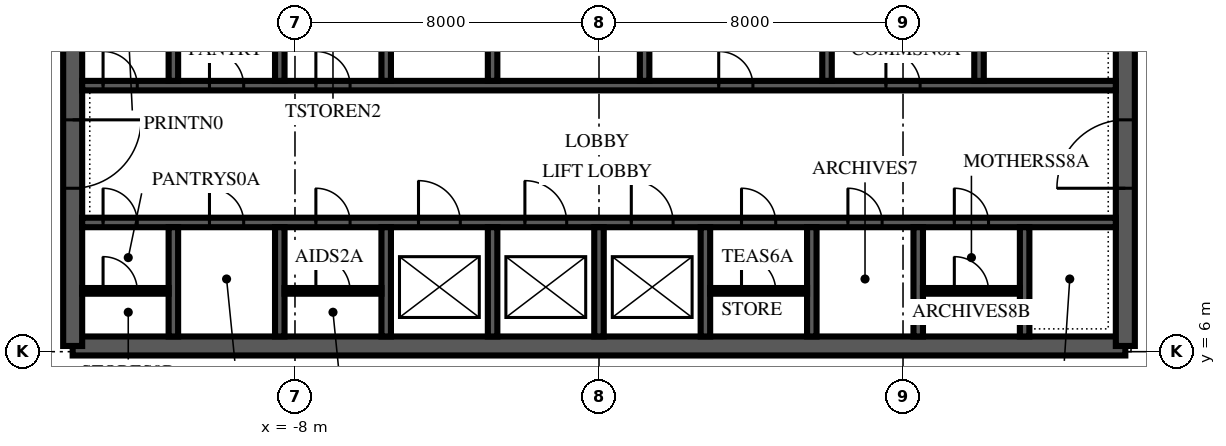
"""IFC4 building model, lengths in metres.
Left out: names, types, materials, properties, quantities, classifications, styles, units other than length and angle.
Written with IfcOpenShell. Run it as: python <this file> out.ifc"""

import sys

from ifc_helpers import new_model, si_unit, direction, frame, frame_2d, origin, place, context, subcontext, project, spatial, polyline, rectangle, outline, extrude, element, fill, save


model = new_model("IFC4")
c1 = context("Model", 3, precision=1e-05, world=origin(), true_north=direction((0.0, 1.0)))
c2 = subcontext(c1, "Body", "Model", "MODEL_VIEW")
j1 = project(units=[si_unit("LENGTHUNIT", "METRE"), si_unit("PLANEANGLEUNIT", "RADIAN")], contexts=[c1])
p1 = place(None, origin())
s1 = spatial("IfcSite", under=j1, at=p1, CompositionType="ELEMENT")
p2 = place(p1, origin())
s2 = spatial("IfcBuilding", under=s1, at=p2, CompositionType="ELEMENT")
p3 = place(p2, frame((0.0, 0.0, 248.0)))
s3 = spatial("IfcBuildingStorey", under=s2, at=p3, CompositionType="ELEMENT", Elevation=248.0)
p4 = place(p3, frame((-13.85, 6.15, 0.0), z_axis=(0.0, 0.0, 1.0), x_axis=(1.0, 0.0, 0.0)))
e1 = element("IfcWall", 1, at=p4, inside=s3, PredefinedType="SHEAR", context=c2, shape_type="SweptSolid", body=[
    extrude(rectangle(XDim=27.7, YDim=0.5, at=frame_2d((13.85, 0.0))), origin(), (0.0, 0.0, 1.0), 4.0),
])
p5 = place(p3, frame((13.85, 6.15, 0.0), z_axis=(0.0, 0.0, 1.0), x_axis=(0.0, 1.0, 0.0)))
e2 = element("IfcWall", 2, at=p5, inside=s3, PredefinedType="SHEAR", context=c2, shape_type="SweptSolid", body=[
    extrude(outline(polyline([(0.0, -0.25), (17.7, -0.25), (17.7, 0.0), (17.45, 0.0), (17.45, 0.25), (0.25, 0.25), (0.25, 0.0), (0.0, 0.0), (0.0, -0.25)])), origin(), (0.0, 0.0, 1.0), 4.0),
])
p6 = place(p5, frame((4.15, 0.0, 0.0)))
e3 = element("IfcOpeningElement", 3, at=p6, cuts=e2, PredefinedType="OPENING", context=c2, shape_type="SweptSolid", body=[
    extrude(rectangle(XDim=1.8, YDim=2.4, at=frame_2d((0.9, 1.2))), frame((0.0, 0.265, 0.0), z_axis=(0.0, -1.0, 0.0), x_axis=(1.0, 0.0, 0.0)), (0.0, 0.0, 1.0), 0.53),
])
p7 = place(p3, frame((-13.85, 23.85, 0.0), z_axis=(0.0, 0.0, 1.0), x_axis=(0.0, -1.0, 0.0)))
e4 = element("IfcWall", 4, at=p7, inside=s3, PredefinedType="SHEAR", context=c2, shape_type="SweptSolid", body=[
    extrude(outline(polyline([(0.0, -0.25), (17.7, -0.25), (17.7, 0.0), (17.45, 0.0), (17.45, 0.25), (0.25, 0.25), (0.25, 0.0), (0.0, 0.0), (0.0, -0.25)])), origin(), (0.0, 0.0, 1.0), 4.0),
])
p8 = place(p7, frame((11.75, 0.0, 0.0)))
e5 = element("IfcOpeningElement", 5, at=p8, cuts=e4, PredefinedType="OPENING", context=c2, shape_type="SweptSolid", body=[
    extrude(rectangle(XDim=1.8, YDim=2.4, at=frame_2d((0.9, 1.2))), frame((0.0, 0.265, 0.0), z_axis=(0.0, -1.0, 0.0), x_axis=(1.0, 0.0, 0.0)), (0.0, 0.0, 1.0), 0.53),
])
p9 = place(p3, frame((-13.6, 9.4, 0.0), z_axis=(0.0, 0.0, 1.0), x_axis=(1.0, 0.0, 0.0)))
e6 = element("IfcWall", 6, at=p9, inside=s3, PredefinedType="SHEAR", context=c2, shape_type="SweptSolid", body=[
    extrude(rectangle(XDim=27.2, YDim=0.25, at=frame_2d((13.6, 0.0))), origin(), (0.0, 0.0, 1.0), 4.0),
])
p10 = place(p9, frame((8.85, 0.0, 0.0)))
e7 = element("IfcOpeningElement", 7, at=p10, cuts=e6, PredefinedType="OPENING", context=c2, shape_type="SweptSolid", body=[
    extrude(rectangle(XDim=1.1, YDim=2.1, at=frame_2d((0.55, 1.05))), frame((0.0, 0.14, 0.0), z_axis=(0.0, -1.0, 0.0), x_axis=(1.0, 0.0, 0.0)), (0.0, 0.0, 1.0), 0.28),
])
p11 = place(p9, frame((11.65, 0.0, 0.0)))
e8 = element("IfcOpeningElement", 8, at=p11, cuts=e6, PredefinedType="OPENING", context=c2, shape_type="SweptSolid", body=[
    extrude(rectangle(XDim=1.1, YDim=2.1, at=frame_2d((0.55, 1.05))), frame((0.0, 0.14, 0.0), z_axis=(0.0, -1.0, 0.0), x_axis=(1.0, 0.0, 0.0)), (0.0, 0.0, 1.0), 0.28),
])
p12 = place(p9, frame((14.45, 0.0, 0.0)))
e9 = element("IfcOpeningElement", 9, at=p12, cuts=e6, PredefinedType="OPENING", context=c2, shape_type="SweptSolid", body=[
    extrude(rectangle(XDim=1.1, YDim=2.1, at=frame_2d((0.55, 1.05))), frame((0.0, 0.14, 0.0), z_axis=(0.0, -1.0, 0.0), x_axis=(1.0, 0.0, 0.0)), (0.0, 0.0, 1.0), 0.28),
])
p13 = place(p9, frame((0.55, 0.0, 0.0)))
e10 = element("IfcOpeningElement", 10, at=p13, cuts=e6, PredefinedType="OPENING", context=c2, shape_type="SweptSolid", body=[
    extrude(rectangle(XDim=0.9, YDim=2.1, at=frame_2d((0.45, 1.05))), frame((0.0, 0.14, 0.0), z_axis=(0.0, -1.0, 0.0), x_axis=(1.0, 0.0, 0.0)), (0.0, 0.0, 1.0), 0.28),
])
p14 = place(p9, frame((3.35, 0.0, 0.0)))
e11 = element("IfcOpeningElement", 11, at=p14, cuts=e6, PredefinedType="OPENING", context=c2, shape_type="SweptSolid", body=[
    extrude(rectangle(XDim=0.9, YDim=2.1, at=frame_2d((0.45, 1.05))), frame((0.0, 0.14, 0.0), z_axis=(0.0, -1.0, 0.0), x_axis=(1.0, 0.0, 0.0)), (0.0, 0.0, 1.0), 0.28),
])
p15 = place(p9, frame((6.15, 0.0, 0.0)))
e12 = element("IfcOpeningElement", 12, at=p15, cuts=e6, PredefinedType="OPENING", context=c2, shape_type="SweptSolid", body=[
    extrude(rectangle(XDim=0.9, YDim=2.1, at=frame_2d((0.45, 1.05))), frame((0.0, 0.14, 0.0), z_axis=(0.0, -1.0, 0.0), x_axis=(1.0, 0.0, 0.0)), (0.0, 0.0, 1.0), 0.28),
])
p16 = place(p9, frame((17.35, 0.0, 0.0)))
e13 = element("IfcOpeningElement", 13, at=p16, cuts=e6, PredefinedType="OPENING", context=c2, shape_type="SweptSolid", body=[
    extrude(rectangle(XDim=0.9, YDim=2.1, at=frame_2d((0.45, 1.05))), frame((0.0, 0.14, 0.0), z_axis=(0.0, -1.0, 0.0), x_axis=(1.0, 0.0, 0.0)), (0.0, 0.0, 1.0), 0.28),
])
p17 = place(p9, frame((20.15, 0.0, 0.0)))
e14 = element("IfcOpeningElement", 14, at=p17, cuts=e6, PredefinedType="OPENING", context=c2, shape_type="SweptSolid", body=[
    extrude(rectangle(XDim=0.9, YDim=2.1, at=frame_2d((0.45, 1.05))), frame((0.0, 0.14, 0.0), z_axis=(0.0, -1.0, 0.0), x_axis=(1.0, 0.0, 0.0)), (0.0, 0.0, 1.0), 0.28),
])
p18 = place(p9, frame((22.95, 0.0, 0.0)))
e15 = element("IfcOpeningElement", 15, at=p18, cuts=e6, PredefinedType="OPENING", context=c2, shape_type="SweptSolid", body=[
    extrude(rectangle(XDim=0.9, YDim=2.1, at=frame_2d((0.45, 1.05))), frame((0.0, 0.14, 0.0), z_axis=(0.0, -1.0, 0.0), x_axis=(1.0, 0.0, 0.0)), (0.0, 0.0, 1.0), 0.28),
])
p19 = place(p3, frame((-13.6, 13.0, 0.0), z_axis=(0.0, 0.0, 1.0), x_axis=(1.0, 0.0, 0.0)))
e16 = element("IfcWall", 16, at=p19, inside=s3, PredefinedType="SHEAR", context=c2, shape_type="SweptSolid", body=[
    extrude(rectangle(XDim=27.2, YDim=0.25, at=frame_2d((13.6, 0.0))), origin(), (0.0, 0.0, 1.0), 4.0),
])
p20 = place(p19, frame((16.75, 0.0, 0.0)))
e17 = element("IfcOpeningElement", 17, at=p20, cuts=e16, PredefinedType="OPENING", context=c2, shape_type="SweptSolid", body=[
    extrude(rectangle(XDim=0.9, YDim=2.1, at=frame_2d((0.45, 1.05))), frame((0.0, 0.14, 0.0), z_axis=(0.0, -1.0, 0.0), x_axis=(1.0, 0.0, 0.0)), (0.0, 0.0, 1.0), 0.28),
])
p21 = place(p19, frame((21.15, 0.0, 0.0)))
e18 = element("IfcOpeningElement", 18, at=p21, cuts=e16, PredefinedType="OPENING", context=c2, shape_type="SweptSolid", body=[
    extrude(rectangle(XDim=0.9, YDim=2.1, at=frame_2d((0.45, 1.05))), frame((0.0, 0.14, 0.0), z_axis=(0.0, -1.0, 0.0), x_axis=(1.0, 0.0, 0.0)), (0.0, 0.0, 1.0), 0.28),
])
p22 = place(p19, frame((0.55, 0.0, 0.0)))
e19 = element("IfcOpeningElement", 19, at=p22, cuts=e16, PredefinedType="OPENING", context=c2, shape_type="SweptSolid", body=[
    extrude(rectangle(XDim=0.9, YDim=2.1, at=frame_2d((0.45, 1.05))), frame((0.0, 0.14, 0.0), z_axis=(0.0, -1.0, 0.0), x_axis=(1.0, 0.0, 0.0)), (0.0, 0.0, 1.0), 0.28),
])
p23 = place(p19, frame((3.35, 0.0, 0.0)))
e20 = element("IfcOpeningElement", 20, at=p23, cuts=e16, PredefinedType="OPENING", context=c2, shape_type="SweptSolid", body=[
    extrude(rectangle(XDim=0.9, YDim=2.1, at=frame_2d((0.45, 1.05))), frame((0.0, 0.14, 0.0), z_axis=(0.0, -1.0, 0.0), x_axis=(1.0, 0.0, 0.0)), (0.0, 0.0, 1.0), 0.28),
])
p24 = place(p19, frame((6.15, 0.0, 0.0)))
e21 = element("IfcOpeningElement", 21, at=p24, cuts=e16, PredefinedType="OPENING", context=c2, shape_type="SweptSolid", body=[
    extrude(rectangle(XDim=0.9, YDim=2.1, at=frame_2d((0.45, 1.05))), frame((0.0, 0.14, 0.0), z_axis=(0.0, -1.0, 0.0), x_axis=(1.0, 0.0, 0.0)), (0.0, 0.0, 1.0), 0.28),
])
for number, where, z_axis, x_axis in (
    (22, (-11.2, 6.4, 0.0), (0.0, 0.0, 1.0), (0.0, 1.0, 0.0)),
    (23, (-8.4, 6.4, 0.0), (0.0, 0.0, 1.0), (0.0, 1.0, 0.0)),
    (24, (-5.6, 6.4, 0.0), (0.0, 0.0, 1.0), (0.0, 1.0, 0.0)),
    (25, (-2.8, 6.4, 0.0), (0.0, 0.0, 1.0), (0.0, 1.0, 0.0)),
    (26, (0.0, 6.4, 0.0), (0.0, 0.0, 1.0), (0.0, 1.0, 0.0)),
    (27, (2.8, 6.4, 0.0), (0.0, 0.0, 1.0), (0.0, 1.0, 0.0)),
    (28, (5.6, 6.4, 0.0), (0.0, 0.0, 1.0), (0.0, 1.0, 0.0)),
    (29, (8.4, 6.4, 0.0), (0.0, 0.0, 1.0), (0.0, 1.0, 0.0)),
    (30, (11.2, 6.4, 0.0), (0.0, 0.0, 1.0), (0.0, 1.0, 0.0)),
):
    element("IfcWall", number, at=place(p3, frame(where, z_axis=z_axis, x_axis=x_axis)), inside=s3, PredefinedType="SHEAR", context=c2, shape_type="SweptSolid", body=[
        extrude(rectangle(XDim=2.875, YDim=0.25, at=frame_2d((1.438, 0.0))), origin(), (0.0, 0.0, 1.0), 4.0),
    ])
for number, where, z_axis, x_axis in (
    (31, (-11.2, 13.125, 0.0), (0.0, 0.0, 1.0), (0.0, 1.0, 0.0)),
    (32, (-8.4, 13.125, 0.0), (0.0, 0.0, 1.0), (0.0, 1.0, 0.0)),
    (33, (-5.6, 13.125, 0.0), (0.0, 0.0, 1.0), (0.0, 1.0, 0.0)),
    (34, (-2.8, 13.125, 0.0), (0.0, 0.0, 1.0), (0.0, 1.0, 0.0)),
    (35, (1.2, 13.125, 0.0), (0.0, 0.0, 1.0), (0.0, 1.0, 0.0)),
    (36, (6.0, 13.125, 0.0), (0.0, 0.0, 1.0), (0.0, 1.0, 0.0)),
    (37, (10.0, 13.125, 0.0), (0.0, 0.0, 1.0), (0.0, 1.0, 0.0)),
):
    element("IfcWall", number, at=place(p3, frame(where, z_axis=z_axis, x_axis=x_axis)), inside=s3, PredefinedType="SHEAR", context=c2, shape_type="SweptSolid", body=[
        extrude(rectangle(XDim=2.75, YDim=0.25, at=frame_2d((1.375, 0.0))), origin(), (0.0, 0.0, 1.0), 4.0),
    ])
p25 = place(p3, frame((-13.6, 7.6, 0.0), z_axis=(0.0, 0.0, 1.0), x_axis=(1.0, 0.0, 0.0)))
e38 = element("IfcWall", 38, at=p25, inside=s3, PredefinedType="PARTITIONING", context=c2, shape_type="SweptSolid", body=[
    extrude(rectangle(XDim=2.275, YDim=0.15, at=frame_2d((1.138, 0.0))), origin(), (0.0, 0.0, 1.0), 3.85),
])
p26 = place(p25, frame((0.55, 0.0, 0.0)))
e39 = element("IfcOpeningElement", 39, at=p26, cuts=e38, PredefinedType="OPENING", context=c2, shape_type="SweptSolid", body=[
    extrude(rectangle(XDim=0.9, YDim=2.1, at=frame_2d((0.45, 1.05))), frame((0.0, 0.09, 0.0), z_axis=(0.0, -1.0, 0.0), x_axis=(1.0, 0.0, 0.0)), (0.0, 0.0, 1.0), 0.18),
])
p27 = place(p3, frame((-8.275, 7.6, 0.0), z_axis=(0.0, 0.0, 1.0), x_axis=(1.0, 0.0, 0.0)))
e40 = element("IfcWall", 40, at=p27, inside=s3, PredefinedType="PARTITIONING", context=c2, shape_type="SweptSolid", body=[
    extrude(rectangle(XDim=2.55, YDim=0.15, at=frame_2d((1.275, 0.0))), origin(), (0.0, 0.0, 1.0), 3.85),
])
p28 = place(p27, frame((0.825, 0.0, 0.0)))
e41 = element("IfcOpeningElement", 41, at=p28, cuts=e40, PredefinedType="OPENING", context=c2, shape_type="SweptSolid", body=[
    extrude(rectangle(XDim=0.9, YDim=2.1, at=frame_2d((0.45, 1.05))), frame((0.0, 0.09, 0.0), z_axis=(0.0, -1.0, 0.0), x_axis=(1.0, 0.0, 0.0)), (0.0, 0.0, 1.0), 0.18),
])
p29 = place(p3, frame((2.925, 7.6, 0.0), z_axis=(0.0, 0.0, 1.0), x_axis=(1.0, 0.0, 0.0)))
e42 = element("IfcWall", 42, at=p29, inside=s3, PredefinedType="PARTITIONING", context=c2, shape_type="SweptSolid", body=[
    extrude(rectangle(XDim=2.55, YDim=0.15, at=frame_2d((1.275, 0.0))), origin(), (0.0, 0.0, 1.0), 3.85),
])
p30 = place(p29, frame((0.825, 0.0, 0.0)))
e43 = element("IfcOpeningElement", 43, at=p30, cuts=e42, PredefinedType="OPENING", context=c2, shape_type="SweptSolid", body=[
    extrude(rectangle(XDim=0.9, YDim=2.1, at=frame_2d((0.45, 1.05))), frame((0.0, 0.09, 0.0), z_axis=(0.0, -1.0, 0.0), x_axis=(1.0, 0.0, 0.0)), (0.0, 0.0, 1.0), 0.18),
])
p31 = place(p3, frame((8.525, 7.6, 0.0), z_axis=(0.0, 0.0, 1.0), x_axis=(1.0, 0.0, 0.0)))
e44 = element("IfcWall", 44, at=p31, inside=s3, PredefinedType="PARTITIONING", context=c2, shape_type="SweptSolid", body=[
    extrude(rectangle(XDim=2.55, YDim=0.15, at=frame_2d((1.275, 0.0))), origin(), (0.0, 0.0, 1.0), 3.85),
])
p32 = place(p31, frame((0.825, 0.0, 0.0)))
e45 = element("IfcOpeningElement", 45, at=p32, cuts=e44, PredefinedType="OPENING", context=c2, shape_type="SweptSolid", body=[
    extrude(rectangle(XDim=0.9, YDim=2.1, at=frame_2d((0.45, 1.05))), frame((0.0, 0.09, 0.0), z_axis=(0.0, -1.0, 0.0), x_axis=(1.0, 0.0, 0.0)), (0.0, 0.0, 1.0), 0.18),
])
p33 = place(p6, origin())
e46 = element("IfcDoor", 46, at=p33, inside=s3, OperationType="DOUBLE_DOOR_SINGLE_SWING", PredefinedType="DOOR", context=c2, shape_type="SweptSolid", body=[
    extrude(rectangle(XDim=1.8, YDim=2.4, at=frame_2d((0.9, 1.2))), frame((0.0, 0.25, 0.0), z_axis=(0.0, -1.0, 0.0), x_axis=(1.0, 0.0, 0.0)), (0.0, 0.0, 1.0), 0.5),
])
fill(e3, e46)
p34 = place(p8, origin())
e47 = element("IfcDoor", 47, at=p34, inside=s3, OperationType="DOUBLE_DOOR_SINGLE_SWING", PredefinedType="DOOR", context=c2, shape_type="SweptSolid", body=[
    extrude(rectangle(XDim=1.8, YDim=2.4, at=frame_2d((0.9, 1.2))), frame((0.0, 0.25, 0.0), z_axis=(0.0, -1.0, 0.0), x_axis=(1.0, 0.0, 0.0)), (0.0, 0.0, 1.0), 0.5),
])
fill(e5, e47)
p35 = place(p10, origin())
e48 = element("IfcDoor", 48, at=p35, inside=s3, OperationType="SLIDING_TO_LEFT", PredefinedType="DOOR", context=c2, shape_type="SweptSolid", body=[
    extrude(rectangle(XDim=1.1, YDim=2.1, at=frame_2d((0.55, 1.05))), frame((0.0, 0.125, 0.0), z_axis=(0.0, -1.0, 0.0), x_axis=(1.0, 0.0, 0.0)), (0.0, 0.0, 1.0), 0.25),
])
fill(e7, e48)
p36 = place(p11, origin())
e49 = element("IfcDoor", 49, at=p36, inside=s3, OperationType="SLIDING_TO_LEFT", PredefinedType="DOOR", context=c2, shape_type="SweptSolid", body=[
    extrude(rectangle(XDim=1.1, YDim=2.1, at=frame_2d((0.55, 1.05))), frame((0.0, 0.125, 0.0), z_axis=(0.0, -1.0, 0.0), x_axis=(1.0, 0.0, 0.0)), (0.0, 0.0, 1.0), 0.25),
])
fill(e8, e49)
p37 = place(p12, origin())
e50 = element("IfcDoor", 50, at=p37, inside=s3, OperationType="SLIDING_TO_LEFT", PredefinedType="DOOR", context=c2, shape_type="SweptSolid", body=[
    extrude(rectangle(XDim=1.1, YDim=2.1, at=frame_2d((0.55, 1.05))), frame((0.0, 0.125, 0.0), z_axis=(0.0, -1.0, 0.0), x_axis=(1.0, 0.0, 0.0)), (0.0, 0.0, 1.0), 0.25),
])
fill(e9, e50)
p38 = place(p20, origin())
e51 = element("IfcDoor", 51, at=p38, inside=s3, OperationType="SINGLE_SWING_LEFT", PredefinedType="DOOR", context=c2, shape_type="SweptSolid", body=[
    extrude(rectangle(XDim=0.9, YDim=2.1, at=frame_2d((0.45, 1.05))), frame((0.0, 0.125, 0.0), z_axis=(0.0, -1.0, 0.0), x_axis=(1.0, 0.0, 0.0)), (0.0, 0.0, 1.0), 0.25),
])
fill(e17, e51)
p39 = place(p21, origin())
e52 = element("IfcDoor", 52, at=p39, inside=s3, OperationType="SINGLE_SWING_LEFT", PredefinedType="DOOR", context=c2, shape_type="SweptSolid", body=[
    extrude(rectangle(XDim=0.9, YDim=2.1, at=frame_2d((0.45, 1.05))), frame((0.0, 0.125, 0.0), z_axis=(0.0, -1.0, 0.0), x_axis=(1.0, 0.0, 0.0)), (0.0, 0.0, 1.0), 0.25),
])
fill(e18, e52)
p40 = place(p22, origin())
e53 = element("IfcDoor", 53, at=p40, inside=s3, OperationType="SINGLE_SWING_LEFT", PredefinedType="DOOR", context=c2, shape_type="SweptSolid", body=[
    extrude(rectangle(XDim=0.9, YDim=2.1, at=frame_2d((0.45, 1.05))), frame((0.0, 0.125, 0.0), z_axis=(0.0, -1.0, 0.0), x_axis=(1.0, 0.0, 0.0)), (0.0, 0.0, 1.0), 0.25),
])
fill(e19, e53)
p41 = place(p23, origin())
e54 = element("IfcDoor", 54, at=p41, inside=s3, OperationType="SINGLE_SWING_LEFT", PredefinedType="DOOR", context=c2, shape_type="SweptSolid", body=[
    extrude(rectangle(XDim=0.9, YDim=2.1, at=frame_2d((0.45, 1.05))), frame((0.0, 0.125, 0.0), z_axis=(0.0, -1.0, 0.0), x_axis=(1.0, 0.0, 0.0)), (0.0, 0.0, 1.0), 0.25),
])
fill(e20, e54)
p42 = place(p24, origin())
e55 = element("IfcDoor", 55, at=p42, inside=s3, OperationType="SINGLE_SWING_LEFT", PredefinedType="DOOR", context=c2, shape_type="SweptSolid", body=[
    extrude(rectangle(XDim=0.9, YDim=2.1, at=frame_2d((0.45, 1.05))), frame((0.0, 0.125, 0.0), z_axis=(0.0, -1.0, 0.0), x_axis=(1.0, 0.0, 0.0)), (0.0, 0.0, 1.0), 0.25),
])
fill(e21, e55)
p43 = place(p13, origin())
e56 = element("IfcDoor", 56, at=p43, inside=s3, OperationType="SINGLE_SWING_LEFT", PredefinedType="DOOR", context=c2, shape_type="SweptSolid", body=[
    extrude(rectangle(XDim=0.9, YDim=2.1, at=frame_2d((0.45, 1.05))), frame((0.0, 0.125, 0.0), z_axis=(0.0, -1.0, 0.0), x_axis=(1.0, 0.0, 0.0)), (0.0, 0.0, 1.0), 0.25),
])
fill(e10, e56)
p44 = place(p26, origin())
e57 = element("IfcDoor", 57, at=p44, inside=s3, OperationType="SINGLE_SWING_LEFT", PredefinedType="DOOR", context=c2, shape_type="SweptSolid", body=[
    extrude(rectangle(XDim=0.9, YDim=2.1, at=frame_2d((0.45, 1.05))), frame((0.0, 0.075, 0.0), z_axis=(0.0, -1.0, 0.0), x_axis=(1.0, 0.0, 0.0)), (0.0, 0.0, 1.0), 0.149),
])
fill(e39, e57)
p45 = place(p14, origin())
e58 = element("IfcDoor", 58, at=p45, inside=s3, OperationType="SINGLE_SWING_LEFT", PredefinedType="DOOR", context=c2, shape_type="SweptSolid", body=[
    extrude(rectangle(XDim=0.9, YDim=2.1, at=frame_2d((0.45, 1.05))), frame((0.0, 0.125, 0.0), z_axis=(0.0, -1.0, 0.0), x_axis=(1.0, 0.0, 0.0)), (0.0, 0.0, 1.0), 0.25),
])
fill(e11, e58)
p46 = place(p15, origin())
e59 = element("IfcDoor", 59, at=p46, inside=s3, OperationType="SINGLE_SWING_LEFT", PredefinedType="DOOR", context=c2, shape_type="SweptSolid", body=[
    extrude(rectangle(XDim=0.9, YDim=2.1, at=frame_2d((0.45, 1.05))), frame((0.0, 0.125, 0.0), z_axis=(0.0, -1.0, 0.0), x_axis=(1.0, 0.0, 0.0)), (0.0, 0.0, 1.0), 0.25),
])
fill(e12, e59)
p47 = place(p28, origin())
e60 = element("IfcDoor", 60, at=p47, inside=s3, OperationType="SINGLE_SWING_LEFT", PredefinedType="DOOR", context=c2, shape_type="SweptSolid", body=[
    extrude(rectangle(XDim=0.9, YDim=2.1, at=frame_2d((0.45, 1.05))), frame((0.0, 0.075, 0.0), z_axis=(0.0, -1.0, 0.0), x_axis=(1.0, 0.0, 0.0)), (0.0, 0.0, 1.0), 0.149),
])
fill(e41, e60)
p48 = place(p16, origin())
e61 = element("IfcDoor", 61, at=p48, inside=s3, OperationType="SINGLE_SWING_LEFT", PredefinedType="DOOR", context=c2, shape_type="SweptSolid", body=[
    extrude(rectangle(XDim=0.9, YDim=2.1, at=frame_2d((0.45, 1.05))), frame((0.0, 0.125, 0.0), z_axis=(0.0, -1.0, 0.0), x_axis=(1.0, 0.0, 0.0)), (0.0, 0.0, 1.0), 0.25),
])
fill(e13, e61)
p49 = place(p30, origin())
e62 = element("IfcDoor", 62, at=p49, inside=s3, OperationType="SINGLE_SWING_LEFT", PredefinedType="DOOR", context=c2, shape_type="SweptSolid", body=[
    extrude(rectangle(XDim=0.9, YDim=2.1, at=frame_2d((0.45, 1.05))), frame((0.0, 0.075, 0.0), z_axis=(0.0, -1.0, 0.0), x_axis=(1.0, 0.0, 0.0)), (0.0, 0.0, 1.0), 0.149),
])
fill(e43, e62)
p50 = place(p17, origin())
e63 = element("IfcDoor", 63, at=p50, inside=s3, OperationType="SINGLE_SWING_LEFT", PredefinedType="DOOR", context=c2, shape_type="SweptSolid", body=[
    extrude(rectangle(XDim=0.9, YDim=2.1, at=frame_2d((0.45, 1.05))), frame((0.0, 0.125, 0.0), z_axis=(0.0, -1.0, 0.0), x_axis=(1.0, 0.0, 0.0)), (0.0, 0.0, 1.0), 0.25),
])
fill(e14, e63)
p51 = place(p18, origin())
e64 = element("IfcDoor", 64, at=p51, inside=s3, OperationType="SINGLE_SWING_LEFT", PredefinedType="DOOR", context=c2, shape_type="SweptSolid", body=[
    extrude(rectangle(XDim=0.9, YDim=2.1, at=frame_2d((0.45, 1.05))), frame((0.0, 0.125, 0.0), z_axis=(0.0, -1.0, 0.0), x_axis=(1.0, 0.0, 0.0)), (0.0, 0.0, 1.0), 0.25),
])
fill(e15, e64)
p52 = place(p32, origin())
e65 = element("IfcDoor", 65, at=p52, inside=s3, OperationType="SINGLE_SWING_LEFT", PredefinedType="DOOR", context=c2, shape_type="SweptSolid", body=[
    extrude(rectangle(XDim=0.9, YDim=2.1, at=frame_2d((0.45, 1.05))), frame((0.0, 0.075, 0.0), z_axis=(0.0, -1.0, 0.0), x_axis=(1.0, 0.0, 0.0)), (0.0, 0.0, 1.0), 0.149),
])
fill(e45, e65)
save(model, sys.argv[1])
